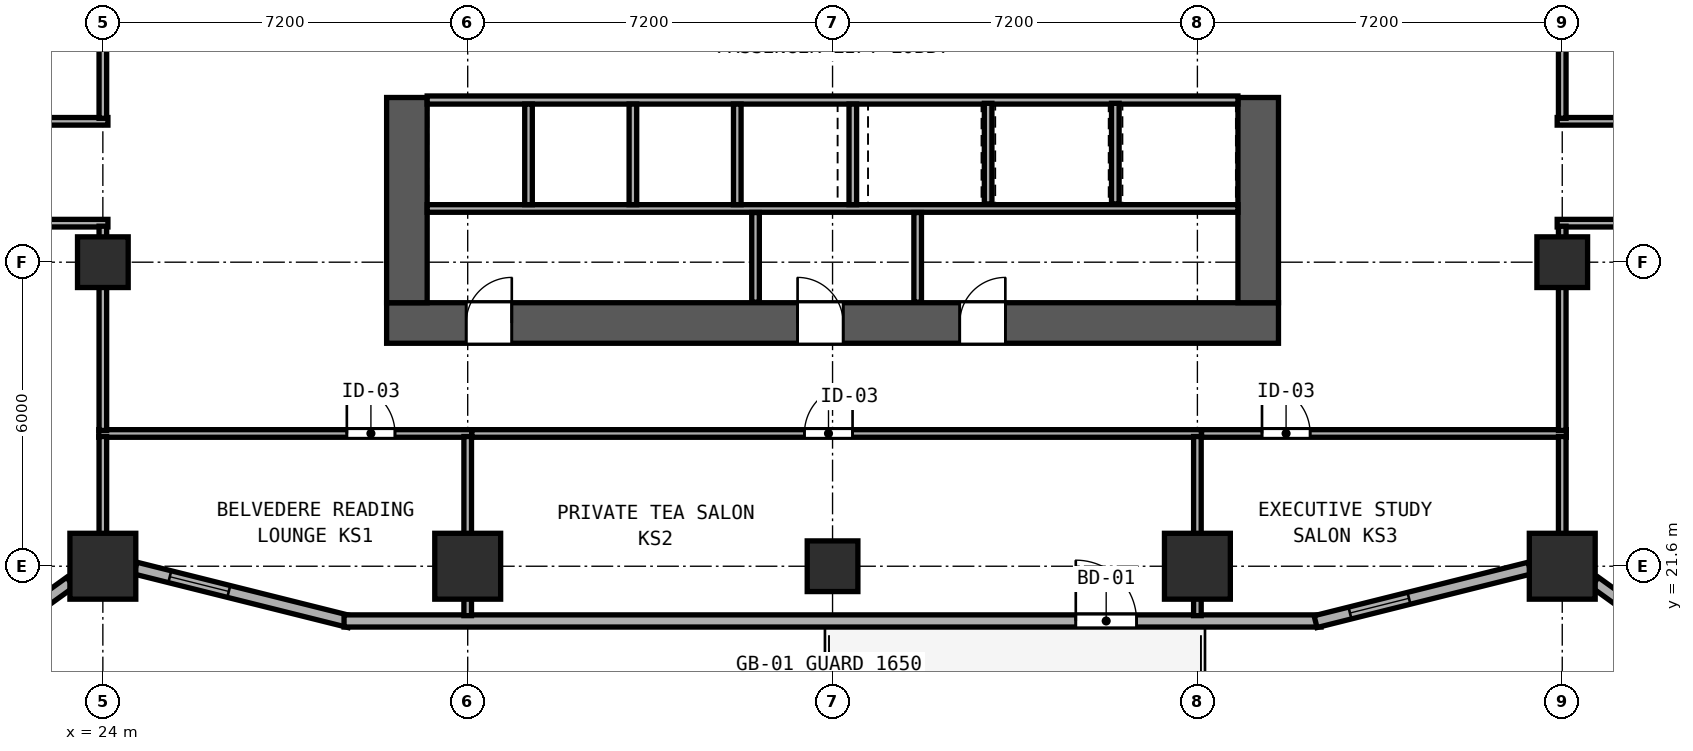
"""IFC4 building model, lengths in metres.
Left out: names, types, materials, properties, quantities, classifications, styles, units other than length and angle.
Written with IfcOpenShell. Run it as: python <this file> out.ifc"""

import sys

from ifc_helpers import new_model, si_unit, direction, frame, frame_2d, origin, origin_2d, place, context, subcontext, project, spatial, rectangle, hollow_rectangle, extrude, element, fill, save


model = new_model("IFC4")
c1 = context("Model", 3, precision=1e-05, world=origin(), true_north=direction((0.0, 1.0)))
c2 = subcontext(c1, "Body", "Model", "MODEL_VIEW")
j1 = project(units=[si_unit("LENGTHUNIT", "METRE"), si_unit("PLANEANGLEUNIT", "RADIAN")], contexts=[c1])
p1 = place(None, origin())
s1 = spatial("IfcSite", under=j1, at=p1, CompositionType="ELEMENT")
p2 = place(p1, origin())
s2 = spatial("IfcBuilding", under=s1, at=p2, CompositionType="ELEMENT")
p3 = place(p2, frame((0.0, 0.0, 35.4)))
s3 = spatial("IfcBuildingStorey", under=s2, at=p3, CompositionType="ELEMENT", Elevation=35.4)
p4 = place(p3, frame((29.6, 26.4, 0.0), z_axis=(0.0, 0.0, 1.0), x_axis=(1.0, 0.0, 0.0)))
e1 = element("IfcWall", 1, at=p4, inside=s3, PredefinedType="SHEAR", context=c2, shape_type="SweptSolid", body=[
    extrude(rectangle(XDim=17.6, YDim=0.8, at=frame_2d((8.8, 0.0))), origin(), (0.0, 0.0, 1.0), 3.6),
])
p5 = place(p4, frame((2.47, 0.0, 0.0), z_axis=(0.0, 0.0, 1.0), x_axis=(-1.0, 0.0, 0.0)))
e2 = element("IfcOpeningElement", 2, at=p5, cuts=e1, PredefinedType="OPENING", context=c2, shape_type="SweptSolid", body=[
    extrude(rectangle(XDim=0.9, YDim=2.1, at=frame_2d((0.45, 1.05))), frame((0.0, 0.41, 0.0), z_axis=(0.0, -1.0, 0.0), x_axis=(1.0, 0.0, 0.0)), (0.0, 0.0, 1.0), 0.82),
])
p6 = place(p4, frame((9.01, 0.0, 0.0), z_axis=(0.0, 0.0, 1.0), x_axis=(-1.0, 0.0, 0.0)))
e3 = element("IfcOpeningElement", 3, at=p6, cuts=e1, PredefinedType="OPENING", context=c2, shape_type="SweptSolid", body=[
    extrude(rectangle(XDim=0.9, YDim=2.1, at=frame_2d((0.45, 1.05))), frame((0.0, 0.41, 0.0), z_axis=(0.0, -1.0, 0.0), x_axis=(1.0, 0.0, 0.0)), (0.0, 0.0, 1.0), 0.82),
])
p7 = place(p4, frame((12.21, 0.0, 0.0), z_axis=(0.0, 0.0, 1.0), x_axis=(-1.0, 0.0, 0.0)))
e4 = element("IfcOpeningElement", 4, at=p7, cuts=e1, PredefinedType="OPENING", context=c2, shape_type="SweptSolid", body=[
    extrude(rectangle(XDim=0.9, YDim=2.1, at=frame_2d((0.45, 1.05))), frame((0.0, 0.41, 0.0), z_axis=(0.0, -1.0, 0.0), x_axis=(1.0, 0.0, 0.0)), (0.0, 0.0, 1.0), 0.82),
])
for number, where, z_axis, x_axis in (
    (5, (30.0, 26.8, 0.0), (0.0, 0.0, 1.0), (0.0, 1.0, 0.0)),
    (6, (46.8, 26.8, 0.0), (0.0, 0.0, 1.0), (0.0, 1.0, 0.0)),
):
    element("IfcWall", number, at=place(p3, frame(where, z_axis=z_axis, x_axis=x_axis)), inside=s3, PredefinedType="SHEAR", context=c2, shape_type="SweptSolid", body=[
        extrude(rectangle(XDim=4.05, YDim=0.8, at=frame_2d((2.025, 0.0))), origin(), (0.0, 0.0, 1.0), 3.6),
    ])
for number, where, z_axis, x_axis in (
    (7, (24.0, 21.6, 0.0), (0.0, 0.0, 1.0), (1.0, 0.0, 0.0)),
    (8, (52.8, 21.6, 0.0), (0.0, 0.0, 1.0), (1.0, 0.0, 0.0)),
    (9, (31.2, 21.6, 0.0), (0.0, 0.0, 1.0), (1.0, 0.0, 0.0)),
    (10, (45.6, 21.6, 0.0), (0.0, 0.0, 1.0), (1.0, 0.0, 0.0)),
):
    element("IfcColumn", number, at=place(p3, frame(where, z_axis=z_axis, x_axis=x_axis)), inside=s3, PredefinedType="COLUMN", context=c2, shape_type="SweptSolid", body=[
        extrude(hollow_rectangle(XDim=1.3, YDim=1.3, WallThickness=0.048, at=origin_2d()), origin(), (0.0, 0.0, 1.0), 3.8),
    ])
for number, where, z_axis, x_axis in (
    (11, (24.0, 27.6, 0.0), (0.0, 0.0, 1.0), (1.0, 0.0, 0.0)),
    (12, (52.8, 27.6, 0.0), (0.0, 0.0, 1.0), (1.0, 0.0, 0.0)),
    (13, (38.4, 21.6, 0.0), (0.0, 0.0, 1.0), (1.0, 0.0, 0.0)),
):
    element("IfcColumn", number, at=place(p3, frame(where, z_axis=z_axis, x_axis=x_axis)), inside=s3, PredefinedType="COLUMN", context=c2, shape_type="SweptSolid", body=[
        extrude(hollow_rectangle(XDim=1.0, YDim=1.0, WallThickness=0.038, at=origin_2d()), origin(), (0.0, 0.0, 1.0), 3.8),
    ])
p8 = place(p3, frame((14.075, 14.602, 0.0), z_axis=(0.0, 0.0, 1.0), x_axis=(0.811535555989, 0.584303038984, 0.0)))
e14 = element("IfcWall", 14, at=p8, inside=s3, PredefinedType="SOLIDWALL", context=c2, shape_type="SweptSolid", body=[
    extrude(rectangle(XDim=11.438, YDim=0.24, at=frame_2d((5.719, 0.0))), origin(), (0.0, 0.0, 1.0), 3.097),
])
p9 = place(p8, frame((0.7, 0.0, 0.85)))
e15 = element("IfcOpeningElement", 15, at=p9, cuts=e14, PredefinedType="OPENING", context=c2, shape_type="SweptSolid", body=[
    extrude(rectangle(XDim=1.2, YDim=1.85, at=frame_2d((0.6, 0.925))), frame((0.0, 0.13, 0.0), z_axis=(0.0, -1.0, 0.0), x_axis=(1.0, 0.0, 0.0)), (0.0, 0.0, 1.0), 0.26),
])
p10 = place(p8, frame((6.1, 0.0, 0.85)))
e16 = element("IfcOpeningElement", 16, at=p10, cuts=e14, PredefinedType="OPENING", context=c2, shape_type="SweptSolid", body=[
    extrude(rectangle(XDim=1.2, YDim=1.85, at=frame_2d((0.6, 0.925))), frame((0.0, 0.13, 0.0), z_axis=(0.0, -1.0, 0.0), x_axis=(1.0, 0.0, 0.0)), (0.0, 0.0, 1.0), 0.26),
])
p11 = place(p3, frame((24.642, 21.563, 0.0), z_axis=(0.0, 0.0, 1.0), x_axis=(0.970135906278, -0.242561998982, 0.0)))
e17 = element("IfcWall", 17, at=p11, inside=s3, PredefinedType="SOLIDWALL", context=c2, shape_type="SweptSolid", body=[
    extrude(rectangle(XDim=4.356, YDim=0.24, at=frame_2d((2.178, 0.0))), origin(), (0.0, 0.0, 1.0), 3.097),
])
p12 = place(p11, frame((0.7, 0.0, 0.85)))
e18 = element("IfcOpeningElement", 18, at=p12, cuts=e17, PredefinedType="OPENING", context=c2, shape_type="SweptSolid", body=[
    extrude(rectangle(XDim=1.2, YDim=1.85, at=frame_2d((0.6, 0.925))), frame((0.0, 0.13, 0.0), z_axis=(0.0, -1.0, 0.0), x_axis=(1.0, 0.0, 0.0)), (0.0, 0.0, 1.0), 0.26),
])
p13 = place(p3, frame((28.76, 20.52, 0.0), z_axis=(0.0, 0.0, 1.0), x_axis=(1.0, 0.0, 0.0)))
e19 = element("IfcWall", 19, at=p13, inside=s3, PredefinedType="SOLIDWALL", context=c2, shape_type="SweptSolid", body=[
    extrude(rectangle(XDim=19.281, YDim=0.24, at=frame_2d((9.64, 0.0))), origin(), (0.0, 0.0, 1.0), 3.6),
])
p14 = place(p13, frame((15.64, 0.0, 0.0), z_axis=(0.0, 0.0, 1.0), x_axis=(-1.0, 0.0, 0.0)))
e20 = element("IfcOpeningElement", 20, at=p14, cuts=e19, PredefinedType="OPENING", context=c2, shape_type="SweptSolid", body=[
    extrude(rectangle(XDim=1.2, YDim=2.15, at=frame_2d((0.6, 1.075))), frame((0.0, 0.13, 0.0), z_axis=(0.0, -1.0, 0.0), x_axis=(1.0, 0.0, 0.0)), (0.0, 0.0, 1.0), 0.26),
])
p15 = place(p3, frame((47.932, 20.507, 0.0), z_axis=(0.0, 0.0, 1.0), x_axis=(0.970135906278, 0.242561998982, 0.0)))
e21 = element("IfcWall", 21, at=p15, inside=s3, PredefinedType="SOLIDWALL", context=c2, shape_type="SweptSolid", body=[
    extrude(rectangle(XDim=4.356, YDim=0.24, at=frame_2d((2.178, 0.0))), origin(), (0.0, 0.0, 1.0), 3.097),
])
p16 = place(p15, frame((0.7, 0.0, 0.85)))
e22 = element("IfcOpeningElement", 22, at=p16, cuts=e21, PredefinedType="OPENING", context=c2, shape_type="SweptSolid", body=[
    extrude(rectangle(XDim=1.2, YDim=1.85, at=frame_2d((0.6, 0.925))), frame((0.0, 0.13, 0.0), z_axis=(0.0, -1.0, 0.0), x_axis=(1.0, 0.0, 0.0)), (0.0, 0.0, 1.0), 0.26),
])
p17 = place(p3, frame((53.442, 21.286, 0.0), z_axis=(0.0, 0.0, 1.0), x_axis=(0.811542842993, -0.584292917967, 0.0)))
e23 = element("IfcWall", 23, at=p17, inside=s3, PredefinedType="SOLIDWALL", context=c2, shape_type="SweptSolid", body=[
    extrude(rectangle(XDim=11.438, YDim=0.24, at=frame_2d((5.719, 0.0))), origin(), (0.0, 0.0, 1.0), 3.097),
])
p18 = place(p17, frame((0.7, 0.0, 0.85)))
e24 = element("IfcOpeningElement", 24, at=p18, cuts=e23, PredefinedType="OPENING", context=c2, shape_type="SweptSolid", body=[
    extrude(rectangle(XDim=1.2, YDim=1.85, at=frame_2d((0.6, 0.925))), frame((0.0, 0.13, 0.0), z_axis=(0.0, -1.0, 0.0), x_axis=(1.0, 0.0, 0.0)), (0.0, 0.0, 1.0), 0.26),
])
p19 = place(p17, frame((5.819, 0.0, 0.85)))
e25 = element("IfcOpeningElement", 25, at=p19, cuts=e23, PredefinedType="OPENING", context=c2, shape_type="SweptSolid", body=[
    extrude(rectangle(XDim=1.2, YDim=1.85, at=frame_2d((0.6, 0.925))), frame((0.0, 0.13, 0.0), z_axis=(0.0, -1.0, 0.0), x_axis=(1.0, 0.0, 0.0)), (0.0, 0.0, 1.0), 0.26),
])
p20 = place(p3, frame((30.4, 30.8, 0.0), z_axis=(0.0, 0.0, 1.0), x_axis=(1.0, 0.0, 0.0)))
e26 = element("IfcWall", 26, at=p20, inside=s3, PredefinedType="SOLIDWALL", context=c2, shape_type="SweptSolid", body=[
    extrude(rectangle(XDim=16.0, YDim=0.16, at=frame_2d((8.0, 0.0))), origin(), (0.0, 0.0, 1.0), 3.6),
])
p21 = place(p3, frame((30.4, 28.66, 0.0), z_axis=(0.0, 0.0, 1.0), x_axis=(1.0, 0.0, 0.0)))
e27 = element("IfcWall", 27, at=p21, inside=s3, PredefinedType="PARTITIONING", context=c2, shape_type="SweptSolid", body=[
    extrude(rectangle(XDim=16.0, YDim=0.15, at=frame_2d((8.0, 0.0))), origin(), (0.0, 0.0, 1.0), 3.6),
])
for number, where, z_axis, x_axis in (
    (28, (32.4, 28.735, 0.0), (0.0, 0.0, 1.0), (0.0, 1.0, 0.0)),
    (29, (34.46, 28.735, 0.0), (0.0, 0.0, 1.0), (0.0, 1.0, 0.0)),
    (30, (36.52, 28.735, 0.0), (0.0, 0.0, 1.0), (0.0, 1.0, 0.0)),
    (31, (38.8, 28.735, 0.0), (0.0, 0.0, 1.0), (0.0, 1.0, 0.0)),
):
    element("IfcWall", number, at=place(p3, frame(where, z_axis=z_axis, x_axis=x_axis)), inside=s3, PredefinedType="SOLIDWALL", context=c2, shape_type="SweptSolid", body=[
        extrude(rectangle(XDim=1.985, YDim=0.15, at=frame_2d((0.992, 0.0))), origin(), (0.0, 0.0, 1.0), 3.6),
    ])
for number, where, z_axis, x_axis in (
    (32, (36.88, 26.81, 0.0), (0.0, 0.0, 1.0), (0.0, 1.0, 0.0)),
    (33, (40.08, 26.81, 0.0), (0.0, 0.0, 1.0), (0.0, 1.0, 0.0)),
):
    element("IfcWall", number, at=place(p3, frame(where, z_axis=z_axis, x_axis=x_axis)), inside=s3, PredefinedType="PARTITIONING", context=c2, shape_type="SweptSolid", body=[
        extrude(rectangle(XDim=1.77, YDim=0.15, at=frame_2d((0.885, 0.0))), origin(), (0.0, 0.0, 1.0), 3.6),
    ])
for number, where, z_axis, x_axis in (
    (34, (41.47, 28.75, 0.0), (0.0, 0.0, 1.0), (0.0, 1.0, 0.0)),
    (35, (43.98, 28.75, 0.0), (0.0, 0.0, 1.0), (0.0, 1.0, 0.0)),
):
    element("IfcWall", number, at=place(p3, frame(where, z_axis=z_axis, x_axis=x_axis)), inside=s3, PredefinedType="SOLIDWALL", context=c2, shape_type="SweptSolid", body=[
        extrude(rectangle(XDim=1.985, YDim=0.15, at=frame_2d((0.993, 0.0))), origin(), (0.0, 0.0, 1.0), 3.6),
    ])
p22 = place(p3, frame((23.92, 24.22, 0.0), z_axis=(0.0, 0.0, 1.0), x_axis=(1.0, 0.0, 0.0)))
e36 = element("IfcWall", 36, at=p22, inside=s3, PredefinedType="PARTITIONING", context=c2, shape_type="SweptSolid", body=[
    extrude(rectangle(XDim=7.36, YDim=0.15, at=frame_2d((3.68, 0.0))), origin(), (0.0, 0.0, 1.0), 3.6),
])
p23 = place(p22, frame((5.845, 0.0, 0.0), z_axis=(0.0, 0.0, 1.0), x_axis=(-1.0, 0.0, 0.0)))
e37 = element("IfcOpeningElement", 37, at=p23, cuts=e36, PredefinedType="OPENING", context=c2, shape_type="SweptSolid", body=[
    extrude(rectangle(XDim=0.95, YDim=2.12, at=frame_2d((0.475, 1.06))), frame((0.0, 0.085, 0.0), z_axis=(0.0, -1.0, 0.0), x_axis=(1.0, 0.0, 0.0)), (0.0, 0.0, 1.0), 0.17),
])
p24 = place(p3, frame((24.0, 21.819, 0.0), z_axis=(0.0, 0.0, 1.0), x_axis=(0.0, 1.0, 0.0)))
e38 = element("IfcWall", 38, at=p24, inside=s3, PredefinedType="PARTITIONING", context=c2, shape_type="SweptSolid", body=[
    extrude(rectangle(XDim=2.341, YDim=0.15, at=frame_2d((1.171, 0.0))), origin(), (0.0, 0.0, 1.0), 3.097),
])
p25 = place(p3, frame((31.2, 20.625, 0.0), z_axis=(0.0, 0.0, 1.0), x_axis=(0.0, 1.0, 0.0)))
e39 = element("IfcWall", 39, at=p25, inside=s3, PredefinedType="PARTITIONING", context=c2, shape_type="SweptSolid", body=[
    extrude(rectangle(XDim=3.535, YDim=0.15, at=frame_2d((1.768, 0.0))), origin(), (0.0, 0.0, 1.0), 2.985),
])
p26 = place(p3, frame((31.282, 24.22, 0.0), z_axis=(0.0, 0.0, 1.0), x_axis=(1.0, 0.0, 0.0)))
e40 = element("IfcWall", 40, at=p26, inside=s3, PredefinedType="PARTITIONING", context=c2, shape_type="SweptSolid", body=[
    extrude(rectangle(XDim=14.398, YDim=0.15, at=frame_2d((7.199, 0.0))), origin(), (0.0, 0.0, 1.0), 3.6),
])
p27 = place(p26, frame((7.513, 0.0, 0.0), z_axis=(0.0, 0.0, 1.0), x_axis=(-1.0, 0.0, 0.0)))
e41 = element("IfcOpeningElement", 41, at=p27, cuts=e40, PredefinedType="OPENING", context=c2, shape_type="SweptSolid", body=[
    extrude(rectangle(XDim=0.95, YDim=2.12, at=frame_2d((0.475, 1.06))), frame((0.0, 0.085, 0.0), z_axis=(0.0, -1.0, 0.0), x_axis=(1.0, 0.0, 0.0)), (0.0, 0.0, 1.0), 0.17),
])
p28 = place(p3, frame((45.6, 20.625, 0.0), z_axis=(0.0, 0.0, 1.0), x_axis=(0.0, 1.0, 0.0)))
e42 = element("IfcWall", 42, at=p28, inside=s3, PredefinedType="PARTITIONING", context=c2, shape_type="SweptSolid", body=[
    extrude(rectangle(XDim=3.535, YDim=0.15, at=frame_2d((1.768, 0.0))), origin(), (0.0, 0.0, 1.0), 2.985),
])
p29 = place(p3, frame((45.682, 24.22, 0.0), z_axis=(0.0, 0.0, 1.0), x_axis=(1.0, 0.0, 0.0)))
e43 = element("IfcWall", 43, at=p29, inside=s3, PredefinedType="PARTITIONING", context=c2, shape_type="SweptSolid", body=[
    extrude(rectangle(XDim=7.198, YDim=0.15, at=frame_2d((3.599, 0.0))), origin(), (0.0, 0.0, 1.0), 3.6),
])
p30 = place(p29, frame((2.143, 0.0, 0.0), z_axis=(0.0, 0.0, 1.0), x_axis=(-1.0, 0.0, 0.0)))
e44 = element("IfcOpeningElement", 44, at=p30, cuts=e43, PredefinedType="OPENING", context=c2, shape_type="SweptSolid", body=[
    extrude(rectangle(XDim=0.95, YDim=2.12, at=frame_2d((0.475, 1.06))), frame((0.0, 0.085, 0.0), z_axis=(0.0, -1.0, 0.0), x_axis=(1.0, 0.0, 0.0)), (0.0, 0.0, 1.0), 0.17),
])
p31 = place(p3, frame((52.8, 21.819, 0.0), z_axis=(0.0, 0.0, 1.0), x_axis=(0.0, 1.0, 0.0)))
e45 = element("IfcWall", 45, at=p31, inside=s3, PredefinedType="PARTITIONING", context=c2, shape_type="SweptSolid", body=[
    extrude(rectangle(XDim=2.341, YDim=0.15, at=frame_2d((1.171, 0.0))), origin(), (0.0, 0.0, 1.0), 3.097),
])
p32 = place(p3, frame((19.952, 30.38, 0.0), z_axis=(0.0, 0.0, 1.0), x_axis=(1.0, 0.0, 0.0)))
e46 = element("IfcWall", 46, at=p32, inside=s3, PredefinedType="PARTITIONING", context=c2, shape_type="SweptSolid", body=[
    extrude(rectangle(XDim=4.148, YDim=0.15, at=frame_2d((2.074, 0.0))), origin(), (0.0, 0.0, 1.0), 3.6),
])
p33 = place(p32, frame((0.14, 0.0, 0.0)))
e47 = element("IfcOpeningElement", 47, at=p33, cuts=e46, PredefinedType="OPENING", context=c2, shape_type="SweptSolid", body=[
    extrude(rectangle(XDim=0.95, YDim=2.15, at=frame_2d((0.475, 1.075))), frame((0.0, 0.085, 0.0), z_axis=(0.0, -1.0, 0.0), x_axis=(1.0, 0.0, 0.0)), (0.0, 0.0, 1.0), 0.17),
])
p34 = place(p3, frame((24.0, 30.44, 0.0), z_axis=(0.0, 0.0, 1.0), x_axis=(0.0, 1.0, 0.0)))
e48 = element("IfcWall", 48, at=p34, inside=s3, PredefinedType="PARTITIONING", context=c2, shape_type="SweptSolid", body=[
    extrude(rectangle(XDim=2.5, YDim=0.15, at=frame_2d((1.25, 0.0))), origin(), (0.0, 0.0, 1.0), 3.097),
])
p35 = place(p3, frame((17.512, 28.37, 0.0), z_axis=(0.0, 0.0, 1.0), x_axis=(1.0, 0.0, 0.0)))
e49 = element("IfcWall", 49, at=p35, inside=s3, PredefinedType="PARTITIONING", context=c2, shape_type="SweptSolid", body=[
    extrude(rectangle(XDim=6.588, YDim=0.15, at=frame_2d((3.294, 0.0))), origin(), (0.0, 0.0, 1.0), 3.6),
])
p36 = place(p35, frame((1.09, 0.0, 0.0), z_axis=(0.0, 0.0, 1.0), x_axis=(-1.0, 0.0, 0.0)))
e50 = element("IfcOpeningElement", 50, at=p36, cuts=e49, PredefinedType="OPENING", context=c2, shape_type="SweptSolid", body=[
    extrude(rectangle(XDim=0.95, YDim=2.18, at=frame_2d((0.475, 1.09))), frame((0.0, 0.085, 0.0), z_axis=(0.0, -1.0, 0.0), x_axis=(1.0, 0.0, 0.0)), (0.0, 0.0, 1.0), 0.17),
])
p37 = place(p3, frame((24.0, 24.28, 0.0), z_axis=(0.0, 0.0, 1.0), x_axis=(0.0, 1.0, 0.0)))
e51 = element("IfcWall", 51, at=p37, inside=s3, PredefinedType="PARTITIONING", context=c2, shape_type="SweptSolid", body=[
    extrude(rectangle(XDim=4.03, YDim=0.15, at=frame_2d((2.015, 0.0))), origin(), (0.0, 0.0, 1.0), 3.097),
])
p38 = place(p3, frame((52.7, 30.38, 0.0), z_axis=(0.0, 0.0, 1.0), x_axis=(1.0, 0.0, 0.0)))
e52 = element("IfcWall", 52, at=p38, inside=s3, PredefinedType="PARTITIONING", context=c2, shape_type="SweptSolid", body=[
    extrude(rectangle(XDim=7.76, YDim=0.15, at=frame_2d((3.88, 0.0))), origin(), (0.0, 0.0, 1.0), 3.6),
])
p39 = place(p38, frame((3.294, 0.0, 0.0)))
e53 = element("IfcOpeningElement", 53, at=p39, cuts=e52, PredefinedType="OPENING", context=c2, shape_type="SweptSolid", body=[
    extrude(rectangle(XDim=0.95, YDim=2.18, at=frame_2d((0.475, 1.09))), frame((0.0, 0.085, 0.0), z_axis=(0.0, -1.0, 0.0), x_axis=(1.0, 0.0, 0.0)), (0.0, 0.0, 1.0), 0.17),
])
p40 = place(p3, frame((52.8, 30.44, 0.0), z_axis=(0.0, 0.0, 1.0), x_axis=(0.0, 1.0, 0.0)))
e54 = element("IfcWall", 54, at=p40, inside=s3, PredefinedType="PARTITIONING", context=c2, shape_type="SweptSolid", body=[
    extrude(rectangle(XDim=2.5, YDim=0.15, at=frame_2d((1.25, 0.0))), origin(), (0.0, 0.0, 1.0), 3.097),
])
p41 = place(p3, frame((52.7, 28.37, 0.0), z_axis=(0.0, 0.0, 1.0), x_axis=(1.0, 0.0, 0.0)))
e55 = element("IfcWall", 55, at=p41, inside=s3, PredefinedType="PARTITIONING", context=c2, shape_type="SweptSolid", body=[
    extrude(rectangle(XDim=6.79, YDim=0.15, at=frame_2d((3.395, 0.0))), origin(), (0.0, 0.0, 1.0), 3.6),
])
p42 = place(p41, frame((5.24, 0.0, 0.0), z_axis=(0.0, 0.0, 1.0), x_axis=(-1.0, 0.0, 0.0)))
e56 = element("IfcOpeningElement", 56, at=p42, cuts=e55, PredefinedType="OPENING", context=c2, shape_type="SweptSolid", body=[
    extrude(rectangle(XDim=0.95, YDim=2.18, at=frame_2d((0.475, 1.09))), frame((0.0, 0.085, 0.0), z_axis=(0.0, -1.0, 0.0), x_axis=(1.0, 0.0, 0.0)), (0.0, 0.0, 1.0), 0.17),
])
p43 = place(p3, frame((52.8, 24.28, 0.0), z_axis=(0.0, 0.0, 1.0), x_axis=(0.0, 1.0, 0.0)))
e57 = element("IfcWall", 57, at=p43, inside=s3, PredefinedType="PARTITIONING", context=c2, shape_type="SweptSolid", body=[
    extrude(rectangle(XDim=4.03, YDim=0.15, at=frame_2d((2.015, 0.0))), origin(), (0.0, 0.0, 1.0), 3.097),
])
p44 = place(p12, origin())
e58 = element("IfcWindow", 58, at=p44, inside=s3, PartitioningType="SINGLE_PANEL", PredefinedType="WINDOW", context=c2, shape_type="SweptSolid", body=[
    extrude(rectangle(XDim=1.2, YDim=1.85, at=frame_2d((0.6, 0.925))), frame((0.0, 0.03, 0.0), z_axis=(0.0, -1.0, 0.0), x_axis=(1.0, 0.0, 0.0)), (0.0, 0.0, 1.0), 0.06),
])
fill(e18, e58)
p45 = place(p16, origin())
e59 = element("IfcWindow", 59, at=p45, inside=s3, PartitioningType="SINGLE_PANEL", PredefinedType="WINDOW", context=c2, shape_type="SweptSolid", body=[
    extrude(rectangle(XDim=1.2, YDim=1.85, at=frame_2d((0.6, 0.925))), frame((0.0, 0.03, 0.0), z_axis=(0.0, -1.0, 0.0), x_axis=(1.0, 0.0, 0.0)), (0.0, 0.0, 1.0), 0.06),
])
fill(e22, e59)
p46 = place(p14, origin())
e60 = element("IfcDoor", 60, at=p46, inside=s3, OperationType="SINGLE_SWING_RIGHT", PredefinedType="DOOR", context=c2, shape_type="SweptSolid", body=[
    extrude(rectangle(XDim=1.2, YDim=2.15, at=frame_2d((0.6, 1.075))), frame((0.0, 0.025, 0.0), z_axis=(0.0, -1.0, 0.0), x_axis=(1.0, 0.0, 0.0)), (0.0, 0.0, 1.0), 0.05),
])
fill(e20, e60)
p47 = place(p5, origin())
e61 = element("IfcDoor", 61, at=p47, inside=s3, OperationType="SINGLE_SWING_LEFT", PredefinedType="DOOR", context=c2, shape_type="SweptSolid", body=[
    extrude(rectangle(XDim=0.9, YDim=2.1, at=frame_2d((0.45, 1.05))), frame((0.0, -0.195, 0.0), z_axis=(0.0, -1.0, 0.0), x_axis=(1.0, 0.0, 0.0)), (0.0, 0.0, 1.0), 0.05),
])
fill(e2, e61)
p48 = place(p6, origin())
e62 = element("IfcDoor", 62, at=p48, inside=s3, OperationType="SINGLE_SWING_RIGHT", PredefinedType="DOOR", context=c2, shape_type="SweptSolid", body=[
    extrude(rectangle(XDim=0.9, YDim=2.1, at=frame_2d((0.45, 1.05))), frame((0.0, -0.195, 0.0), z_axis=(0.0, -1.0, 0.0), x_axis=(1.0, 0.0, 0.0)), (0.0, 0.0, 1.0), 0.05),
])
fill(e3, e62)
p49 = place(p7, origin())
e63 = element("IfcDoor", 63, at=p49, inside=s3, OperationType="SINGLE_SWING_LEFT", PredefinedType="DOOR", context=c2, shape_type="SweptSolid", body=[
    extrude(rectangle(XDim=0.9, YDim=2.1, at=frame_2d((0.45, 1.05))), frame((0.0, -0.195, 0.0), z_axis=(0.0, -1.0, 0.0), x_axis=(1.0, 0.0, 0.0)), (0.0, 0.0, 1.0), 0.05),
])
fill(e4, e63)
p50 = place(p23, origin())
e64 = element("IfcDoor", 64, at=p50, inside=s3, OperationType="SINGLE_SWING_RIGHT", PredefinedType="DOOR", context=c2, shape_type="SweptSolid", body=[
    extrude(rectangle(XDim=0.95, YDim=2.12, at=frame_2d((0.475, 1.06))), frame((0.0, 0.025, 0.0), z_axis=(0.0, -1.0, 0.0), x_axis=(1.0, 0.0, 0.0)), (0.0, 0.0, 1.0), 0.05),
])
fill(e37, e64)
p51 = place(p27, origin())
e65 = element("IfcDoor", 65, at=p51, inside=s3, OperationType="SINGLE_SWING_LEFT", PredefinedType="DOOR", context=c2, shape_type="SweptSolid", body=[
    extrude(rectangle(XDim=0.95, YDim=2.12, at=frame_2d((0.475, 1.06))), frame((0.0, 0.025, 0.0), z_axis=(0.0, -1.0, 0.0), x_axis=(1.0, 0.0, 0.0)), (0.0, 0.0, 1.0), 0.05),
])
fill(e41, e65)
p52 = place(p30, origin())
e66 = element("IfcDoor", 66, at=p52, inside=s3, OperationType="SINGLE_SWING_RIGHT", PredefinedType="DOOR", context=c2, shape_type="SweptSolid", body=[
    extrude(rectangle(XDim=0.95, YDim=2.12, at=frame_2d((0.475, 1.06))), frame((0.0, 0.025, 0.0), z_axis=(0.0, -1.0, 0.0), x_axis=(1.0, 0.0, 0.0)), (0.0, 0.0, 1.0), 0.05),
])
fill(e44, e66)
save(model, sys.argv[1])
